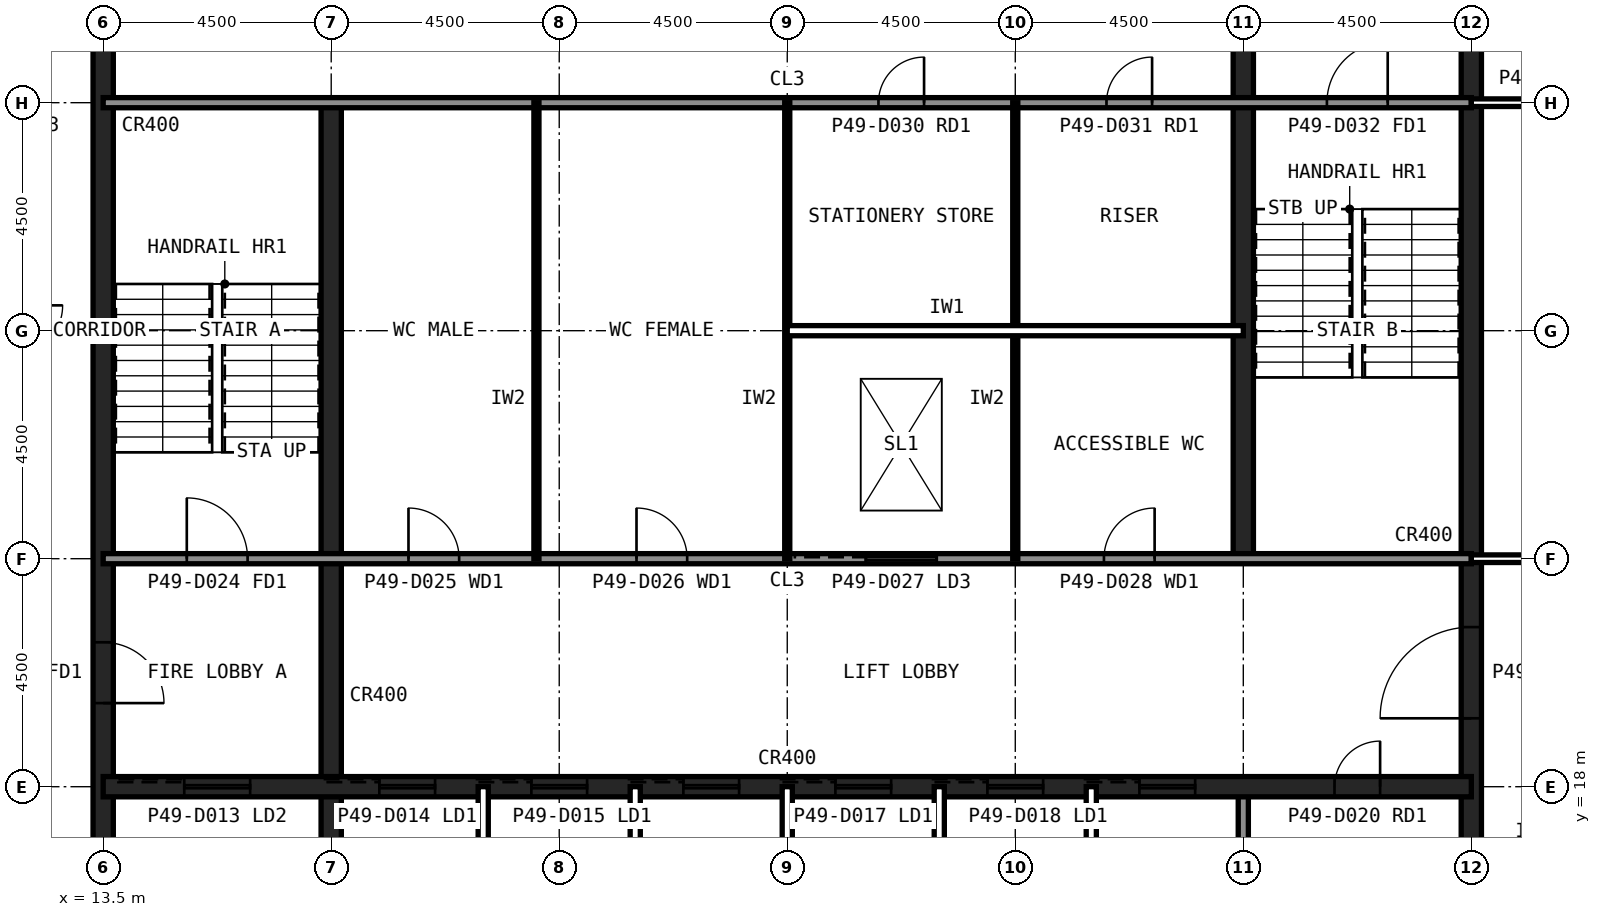
"""IFC4 building model, lengths in metres.
Left out: names, types, materials, properties, quantities, classifications, styles, units other than length and angle.
Written with IfcOpenShell. Run it as: python <this file> out.ifc"""

import sys

from ifc_helpers import new_model, si_unit, direction, frame, frame_2d, origin, place, context, subcontext, project, spatial, rectangle, extrude, element, fill, save


model = new_model("IFC4")
c1 = context("Model", 3, precision=1e-05, world=origin(), true_north=direction((0.0, 1.0)))
c2 = subcontext(c1, "Body", "Model", "MODEL_VIEW")
j1 = project(units=[si_unit("LENGTHUNIT", "METRE"), si_unit("PLANEANGLEUNIT", "RADIAN")], contexts=[c1])
p1 = place(None, origin())
s1 = spatial("IfcSite", under=j1, at=p1, CompositionType="ELEMENT")
p2 = place(p1, origin())
s2 = spatial("IfcBuilding", under=s1, at=p2, CompositionType="ELEMENT")
p3 = place(p2, frame((0.0, 0.0, 210.6)))
s3 = spatial("IfcBuildingStorey", under=s2, at=p3, CompositionType="ELEMENT", Elevation=210.6)
p4 = place(p3, frame((40.5, 13.5, 0.0), z_axis=(0.0, 0.0, 1.0), x_axis=(0.0, 1.0, 0.0)))
e1 = element("IfcWall", 1, at=p4, inside=s3, PredefinedType="SHEAR", context=c2, shape_type="SweptSolid", body=[
    extrude(rectangle(XDim=27.0, YDim=0.4, at=frame_2d((13.5, 0.0))), origin(), (0.0, 0.0, 1.0), 4.0),
])
p5 = place(p4, frame((5.85, 0.0, 0.0)))
e2 = element("IfcOpeningElement", 2, at=p5, cuts=e1, PredefinedType="OPENING", context=c2, shape_type="SweptSolid", body=[
    extrude(rectangle(XDim=1.8, YDim=2.1, at=frame_2d((0.9, 1.05))), frame((0.0, 0.21, 0.0), z_axis=(0.0, -1.0, 0.0), x_axis=(1.0, 0.0, 0.0)), (0.0, 0.0, 1.0), 0.42),
])
p6 = place(p4, frame((19.65, 0.0, 0.0)))
e3 = element("IfcOpeningElement", 3, at=p6, cuts=e1, PredefinedType="OPENING", context=c2, shape_type="SweptSolid", body=[
    extrude(rectangle(XDim=1.2, YDim=2.1, at=frame_2d((0.6, 1.05))), frame((0.0, 0.21, 0.0), z_axis=(0.0, -1.0, 0.0), x_axis=(1.0, 0.0, 0.0)), (0.0, 0.0, 1.0), 0.42),
])
p7 = place(p3, frame((13.5, 40.5, 0.0), z_axis=(0.0, 0.0, 1.0), x_axis=(0.0, -1.0, 0.0)))
e4 = element("IfcWall", 4, at=p7, inside=s3, PredefinedType="SHEAR", context=c2, shape_type="SweptSolid", body=[
    extrude(rectangle(XDim=27.0, YDim=0.4, at=frame_2d((13.5, 0.0))), origin(), (0.0, 0.0, 1.0), 4.0),
])
p8 = place(p7, frame((19.65, 0.0, 0.0)))
e5 = element("IfcOpeningElement", 5, at=p8, cuts=e4, PredefinedType="OPENING", context=c2, shape_type="SweptSolid", body=[
    extrude(rectangle(XDim=1.2, YDim=2.1, at=frame_2d((0.6, 1.05))), frame((0.0, 0.21, 0.0), z_axis=(0.0, -1.0, 0.0), x_axis=(1.0, 0.0, 0.0)), (0.0, 0.0, 1.0), 0.42),
])
p9 = place(p7, frame((5.85, 0.0, 0.0)))
e6 = element("IfcOpeningElement", 6, at=p9, cuts=e4, PredefinedType="OPENING", context=c2, shape_type="SweptSolid", body=[
    extrude(rectangle(XDim=1.8, YDim=2.1, at=frame_2d((0.9, 1.05))), frame((0.0, 0.21, 0.0), z_axis=(0.0, -1.0, 0.0), x_axis=(1.0, 0.0, 0.0)), (0.0, 0.0, 1.0), 0.42),
])
p10 = place(p3, frame((18.0, 13.5, 0.0), z_axis=(0.0, 0.0, 1.0), x_axis=(0.0, 1.0, 0.0)))
e7 = element("IfcWall", 7, at=p10, inside=s3, PredefinedType="SHEAR", context=c2, shape_type="SweptSolid", body=[
    extrude(rectangle(XDim=18.0, YDim=0.4, at=frame_2d((9.0, 0.0))), origin(), (0.0, 0.0, 1.0), 4.0),
])
p11 = place(p3, frame((36.0, 13.5, 0.0), z_axis=(0.0, 0.0, 1.0), x_axis=(0.0, 1.0, 0.0)))
e8 = element("IfcWall", 8, at=p11, inside=s3, PredefinedType="SOLIDWALL", context=c2, shape_type="SweptSolid", body=[
    extrude(rectangle(XDim=4.5, YDim=0.2, at=frame_2d((2.25, 0.0))), origin(), (0.0, 0.0, 1.0), 3.84),
])
p12 = place(p3, frame((36.0, 22.5, 0.0), z_axis=(0.0, 0.0, 1.0), x_axis=(0.0, 1.0, 0.0)))
e9 = element("IfcWall", 9, at=p12, inside=s3, PredefinedType="SHEAR", context=c2, shape_type="SweptSolid", body=[
    extrude(rectangle(XDim=18.0, YDim=0.4, at=frame_2d((9.0, 0.0))), origin(), (0.0, 0.0, 1.0), 4.0),
])
p13 = place(p3, frame((13.5, 18.0, 0.0), z_axis=(0.0, 0.0, 1.0), x_axis=(1.0, 0.0, 0.0)))
e10 = element("IfcWall", 10, at=p13, inside=s3, PredefinedType="SHEAR", context=c2, shape_type="SweptSolid", body=[
    extrude(rectangle(XDim=27.0, YDim=0.4, at=frame_2d((13.5, 0.0))), origin(), (0.0, 0.0, 1.0), 4.0),
])
p14 = place(p13, frame((24.3, 0.0, 0.0)))
e11 = element("IfcOpeningElement", 11, at=p14, cuts=e10, PredefinedType="OPENING", context=c2, shape_type="SweptSolid", body=[
    extrude(rectangle(XDim=0.9, YDim=2.1, at=frame_2d((0.45, 1.05))), frame((0.0, 0.21, 0.0), z_axis=(0.0, -1.0, 0.0), x_axis=(1.0, 0.0, 0.0)), (0.0, 0.0, 1.0), 0.42),
])
p15 = place(p13, frame((5.45, 0.0, 0.0)))
e12 = element("IfcOpeningElement", 12, at=p15, cuts=e10, PredefinedType="OPENING", context=c2, shape_type="SweptSolid", body=[
    extrude(rectangle(XDim=1.1, YDim=2.1, at=frame_2d((0.55, 1.05))), frame((0.0, 0.21, 0.0), z_axis=(0.0, -1.0, 0.0), x_axis=(1.0, 0.0, 0.0)), (0.0, 0.0, 1.0), 0.42),
])
p16 = place(p13, frame((8.45, 0.0, 0.0)))
e13 = element("IfcOpeningElement", 13, at=p16, cuts=e10, PredefinedType="OPENING", context=c2, shape_type="SweptSolid", body=[
    extrude(rectangle(XDim=1.1, YDim=2.1, at=frame_2d((0.55, 1.05))), frame((0.0, 0.21, 0.0), z_axis=(0.0, -1.0, 0.0), x_axis=(1.0, 0.0, 0.0)), (0.0, 0.0, 1.0), 0.42),
])
p17 = place(p13, frame((11.45, 0.0, 0.0)))
e14 = element("IfcOpeningElement", 14, at=p17, cuts=e10, PredefinedType="OPENING", context=c2, shape_type="SweptSolid", body=[
    extrude(rectangle(XDim=1.1, YDim=2.1, at=frame_2d((0.55, 1.05))), frame((0.0, 0.21, 0.0), z_axis=(0.0, -1.0, 0.0), x_axis=(1.0, 0.0, 0.0)), (0.0, 0.0, 1.0), 0.42),
])
p18 = place(p13, frame((14.45, 0.0, 0.0)))
e15 = element("IfcOpeningElement", 15, at=p18, cuts=e10, PredefinedType="OPENING", context=c2, shape_type="SweptSolid", body=[
    extrude(rectangle(XDim=1.1, YDim=2.1, at=frame_2d((0.55, 1.05))), frame((0.0, 0.21, 0.0), z_axis=(0.0, -1.0, 0.0), x_axis=(1.0, 0.0, 0.0)), (0.0, 0.0, 1.0), 0.42),
])
p19 = place(p13, frame((17.45, 0.0, 0.0)))
e16 = element("IfcOpeningElement", 16, at=p19, cuts=e10, PredefinedType="OPENING", context=c2, shape_type="SweptSolid", body=[
    extrude(rectangle(XDim=1.1, YDim=2.1, at=frame_2d((0.55, 1.05))), frame((0.0, 0.21, 0.0), z_axis=(0.0, -1.0, 0.0), x_axis=(1.0, 0.0, 0.0)), (0.0, 0.0, 1.0), 0.42),
])
p20 = place(p13, frame((20.45, 0.0, 0.0)))
e17 = element("IfcOpeningElement", 17, at=p20, cuts=e10, PredefinedType="OPENING", context=c2, shape_type="SweptSolid", body=[
    extrude(rectangle(XDim=1.1, YDim=2.1, at=frame_2d((0.55, 1.05))), frame((0.0, 0.21, 0.0), z_axis=(0.0, -1.0, 0.0), x_axis=(1.0, 0.0, 0.0)), (0.0, 0.0, 1.0), 0.42),
])
p21 = place(p13, frame((1.6, 0.0, 0.0)))
e18 = element("IfcOpeningElement", 18, at=p21, cuts=e10, PredefinedType="OPENING", context=c2, shape_type="SweptSolid", body=[
    extrude(rectangle(XDim=1.3, YDim=2.2, at=frame_2d((0.65, 1.1))), frame((0.0, 0.21, 0.0), z_axis=(0.0, -1.0, 0.0), x_axis=(1.0, 0.0, 0.0)), (0.0, 0.0, 1.0), 0.42),
])
p22 = place(p3, frame((13.5, 22.5, 0.0), z_axis=(0.0, 0.0, 1.0), x_axis=(1.0, 0.0, 0.0)))
e19 = element("IfcWall", 19, at=p22, inside=s3, PredefinedType="SOLIDWALL", context=c2, shape_type="SweptSolid", body=[
    extrude(rectangle(XDim=27.0, YDim=0.2, at=frame_2d((13.5, 0.0))), origin(), (0.0, 0.0, 1.0), 3.84),
])
p23 = place(p22, frame((1.65, 0.0, 0.0)))
e20 = element("IfcOpeningElement", 20, at=p23, cuts=e19, PredefinedType="OPENING", context=c2, shape_type="SweptSolid", body=[
    extrude(rectangle(XDim=1.2, YDim=2.1, at=frame_2d((0.6, 1.05))), frame((0.0, 0.11, 0.0), z_axis=(0.0, -1.0, 0.0), x_axis=(1.0, 0.0, 0.0)), (0.0, 0.0, 1.0), 0.22),
])
p24 = place(p22, frame((6.025, 0.0, 0.0)))
e21 = element("IfcOpeningElement", 21, at=p24, cuts=e19, PredefinedType="OPENING", context=c2, shape_type="SweptSolid", body=[
    extrude(rectangle(XDim=1.0, YDim=2.1, at=frame_2d((0.5, 1.05))), frame((0.0, 0.11, 0.0), z_axis=(0.0, -1.0, 0.0), x_axis=(1.0, 0.0, 0.0)), (0.0, 0.0, 1.0), 0.22),
])
p25 = place(p22, frame((10.525, 0.0, 0.0)))
e22 = element("IfcOpeningElement", 22, at=p25, cuts=e19, PredefinedType="OPENING", context=c2, shape_type="SweptSolid", body=[
    extrude(rectangle(XDim=1.0, YDim=2.1, at=frame_2d((0.5, 1.05))), frame((0.0, 0.11, 0.0), z_axis=(0.0, -1.0, 0.0), x_axis=(1.0, 0.0, 0.0)), (0.0, 0.0, 1.0), 0.22),
])
p26 = place(p22, frame((19.75, 0.0, 0.0)))
e23 = element("IfcOpeningElement", 23, at=p26, cuts=e19, PredefinedType="OPENING", context=c2, shape_type="SweptSolid", body=[
    extrude(rectangle(XDim=1.0, YDim=2.1, at=frame_2d((0.5, 1.05))), frame((0.0, 0.11, 0.0), z_axis=(0.0, -1.0, 0.0), x_axis=(1.0, 0.0, 0.0)), (0.0, 0.0, 1.0), 0.22),
])
p27 = place(p22, frame((15.05, 0.0, 0.0)))
e24 = element("IfcOpeningElement", 24, at=p27, cuts=e19, PredefinedType="OPENING", context=c2, shape_type="SweptSolid", body=[
    extrude(rectangle(XDim=1.4, YDim=2.4, at=frame_2d((0.7, 1.2))), frame((0.0, 0.11, 0.0), z_axis=(0.0, -1.0, 0.0), x_axis=(1.0, 0.0, 0.0)), (0.0, 0.0, 1.0), 0.22),
])
p28 = place(p3, frame((13.5, 31.5, 0.0), z_axis=(0.0, 0.0, 1.0), x_axis=(1.0, 0.0, 0.0)))
e25 = element("IfcWall", 25, at=p28, inside=s3, PredefinedType="SOLIDWALL", context=c2, shape_type="SweptSolid", body=[
    extrude(rectangle(XDim=27.0, YDim=0.2, at=frame_2d((13.5, 0.0))), origin(), (0.0, 0.0, 1.0), 3.84),
])
p29 = place(p28, frame((24.15, 0.0, 0.0)))
e26 = element("IfcOpeningElement", 26, at=p29, cuts=e25, PredefinedType="OPENING", context=c2, shape_type="SweptSolid", body=[
    extrude(rectangle(XDim=1.2, YDim=2.1, at=frame_2d((0.6, 1.05))), frame((0.0, 0.11, 0.0), z_axis=(0.0, -1.0, 0.0), x_axis=(1.0, 0.0, 0.0)), (0.0, 0.0, 1.0), 0.22),
])
p30 = place(p28, frame((15.3, 0.0, 0.0)))
e27 = element("IfcOpeningElement", 27, at=p30, cuts=e25, PredefinedType="OPENING", context=c2, shape_type="SweptSolid", body=[
    extrude(rectangle(XDim=0.9, YDim=2.1, at=frame_2d((0.45, 1.05))), frame((0.0, 0.11, 0.0), z_axis=(0.0, -1.0, 0.0), x_axis=(1.0, 0.0, 0.0)), (0.0, 0.0, 1.0), 0.22),
])
p31 = place(p28, frame((19.8, 0.0, 0.0)))
e28 = element("IfcOpeningElement", 28, at=p31, cuts=e25, PredefinedType="OPENING", context=c2, shape_type="SweptSolid", body=[
    extrude(rectangle(XDim=0.9, YDim=2.1, at=frame_2d((0.45, 1.05))), frame((0.0, 0.11, 0.0), z_axis=(0.0, -1.0, 0.0), x_axis=(1.0, 0.0, 0.0)), (0.0, 0.0, 1.0), 0.22),
])
for number, where, z_axis, x_axis in (
    (29, (21.0, 13.5, 0.0), (0.0, 0.0, 1.0), (0.0, 1.0, 0.0)),
    (30, (24.0, 13.5, 0.0), (0.0, 0.0, 1.0), (0.0, 1.0, 0.0)),
    (31, (27.0, 13.5, 0.0), (0.0, 0.0, 1.0), (0.0, 1.0, 0.0)),
    (32, (30.0, 13.5, 0.0), (0.0, 0.0, 1.0), (0.0, 1.0, 0.0)),
    (33, (33.0, 13.5, 0.0), (0.0, 0.0, 1.0), (0.0, 1.0, 0.0)),
):
    element("IfcWall", number, at=place(p3, frame(where, z_axis=z_axis, x_axis=x_axis)), inside=s3, PredefinedType="PARTITIONING", context=c2, shape_type="SweptSolid", body=[
        extrude(rectangle(XDim=4.5, YDim=0.2, at=frame_2d((2.25, 0.0))), origin(), (0.0, 0.0, 1.0), 3.84),
    ])
for number, where, z_axis, x_axis in (
    (34, (22.05, 22.5, 0.0), (0.0, 0.0, 1.0), (0.0, 1.0, 0.0)),
    (35, (27.0, 22.5, 0.0), (0.0, 0.0, 1.0), (0.0, 1.0, 0.0)),
    (36, (31.5, 22.5, 0.0), (0.0, 0.0, 1.0), (0.0, 1.0, 0.0)),
):
    element("IfcWall", number, at=place(p3, frame(where, z_axis=z_axis, x_axis=x_axis)), inside=s3, PredefinedType="PLUMBINGWALL", context=c2, shape_type="SweptSolid", body=[
        extrude(rectangle(XDim=9.0, YDim=0.1, at=frame_2d((4.5, 0.0))), origin(), (0.0, 0.0, 1.0), 3.84),
    ])
p32 = place(p3, frame((27.0, 27.0, 0.0), z_axis=(0.0, 0.0, 1.0), x_axis=(1.0, 0.0, 0.0)))
e37 = element("IfcWall", 37, at=p32, inside=s3, PredefinedType="PARTITIONING", context=c2, shape_type="SweptSolid", body=[
    extrude(rectangle(XDim=9.0, YDim=0.2, at=frame_2d((4.5, 0.0))), origin(), (0.0, 0.0, 1.0), 3.84),
])
p33 = place(p3, frame((40.5, 22.5, 0.0), z_axis=(0.0, 0.0, 1.0), x_axis=(1.0, 0.0, 0.0)))
e38 = element("IfcWall", 38, at=p33, inside=s3, PredefinedType="PARTITIONING", context=c2, shape_type="SweptSolid", body=[
    extrude(rectangle(XDim=3.6, YDim=0.15, at=frame_2d((1.8, 0.0))), origin(), (0.0, 0.0, 1.0), 2.989),
])
p34 = place(p3, frame((44.1, 31.5, 0.0), z_axis=(0.0, 0.0, 1.0), x_axis=(-1.0, 0.0, 0.0)))
e39 = element("IfcWall", 39, at=p34, inside=s3, PredefinedType="PARTITIONING", context=c2, shape_type="SweptSolid", body=[
    extrude(rectangle(XDim=3.6, YDim=0.15, at=frame_2d((1.8, 0.0))), origin(), (0.0, 0.0, 1.0), 2.989),
])
p35 = place(p34, frame((1.3, 0.0, 0.0)))
e40 = element("IfcOpeningElement", 40, at=p35, cuts=e39, PredefinedType="OPENING", context=c2, shape_type="SweptSolid", body=[
    extrude(rectangle(XDim=1.0, YDim=2.1, at=frame_2d((0.5, 1.05))), frame((0.0, 0.085, 0.0), z_axis=(0.0, -1.0, 0.0), x_axis=(1.0, 0.0, 0.0)), (0.0, 0.0, 1.0), 0.17),
])
p36 = place(p8, origin())
e41 = element("IfcDoor", 41, at=p36, inside=s3, OperationType="SINGLE_SWING_RIGHT", PredefinedType="DOOR", context=c2, shape_type="SweptSolid", body=[
    extrude(rectangle(XDim=1.2, YDim=2.1, at=frame_2d((0.6, 1.05))), frame((0.0, 0.025, 0.0), z_axis=(0.0, -1.0, 0.0), x_axis=(1.0, 0.0, 0.0)), (0.0, 0.0, 1.0), 0.05),
])
fill(e5, e41)
p37 = place(p5, origin())
e42 = element("IfcDoor", 42, at=p37, inside=s3, OperationType="SINGLE_SWING_LEFT", PredefinedType="DOOR", context=c2, shape_type="SweptSolid", body=[
    extrude(rectangle(XDim=1.8, YDim=2.1, at=frame_2d((0.9, 1.05))), frame((0.0, 0.025, 0.0), z_axis=(0.0, -1.0, 0.0), x_axis=(1.0, 0.0, 0.0)), (0.0, 0.0, 1.0), 0.05),
])
fill(e2, e42)
p38 = place(p23, origin())
e43 = element("IfcDoor", 43, at=p38, inside=s3, OperationType="SINGLE_SWING_LEFT", PredefinedType="DOOR", context=c2, shape_type="SweptSolid", body=[
    extrude(rectangle(XDim=1.2, YDim=2.1, at=frame_2d((0.6, 1.05))), frame((0.0, 0.025, 0.0), z_axis=(0.0, -1.0, 0.0), x_axis=(1.0, 0.0, 0.0)), (0.0, 0.0, 1.0), 0.05),
])
fill(e20, e43)
p39 = place(p29, origin())
e44 = element("IfcDoor", 44, at=p39, inside=s3, OperationType="SINGLE_SWING_RIGHT", PredefinedType="DOOR", context=c2, shape_type="SweptSolid", body=[
    extrude(rectangle(XDim=1.2, YDim=2.1, at=frame_2d((0.6, 1.05))), frame((0.0, 0.025, 0.0), z_axis=(0.0, -1.0, 0.0), x_axis=(1.0, 0.0, 0.0)), (0.0, 0.0, 1.0), 0.05),
])
fill(e26, e44)
p40 = place(p24, origin())
e45 = element("IfcDoor", 45, at=p40, inside=s3, OperationType="SINGLE_SWING_LEFT", PredefinedType="DOOR", context=c2, shape_type="SweptSolid", body=[
    extrude(rectangle(XDim=1.0, YDim=2.1, at=frame_2d((0.5, 1.05))), frame((0.0, 0.025, 0.0), z_axis=(0.0, -1.0, 0.0), x_axis=(1.0, 0.0, 0.0)), (0.0, 0.0, 1.0), 0.05),
])
fill(e21, e45)
p41 = place(p25, origin())
e46 = element("IfcDoor", 46, at=p41, inside=s3, OperationType="SINGLE_SWING_LEFT", PredefinedType="DOOR", context=c2, shape_type="SweptSolid", body=[
    extrude(rectangle(XDim=1.0, YDim=2.1, at=frame_2d((0.5, 1.05))), frame((0.0, 0.025, 0.0), z_axis=(0.0, -1.0, 0.0), x_axis=(1.0, 0.0, 0.0)), (0.0, 0.0, 1.0), 0.05),
])
fill(e22, e46)
p42 = place(p26, origin())
e47 = element("IfcDoor", 47, at=p42, inside=s3, OperationType="SINGLE_SWING_RIGHT", PredefinedType="DOOR", context=c2, shape_type="SweptSolid", body=[
    extrude(rectangle(XDim=1.0, YDim=2.1, at=frame_2d((0.5, 1.05))), frame((0.0, 0.025, 0.0), z_axis=(0.0, -1.0, 0.0), x_axis=(1.0, 0.0, 0.0)), (0.0, 0.0, 1.0), 0.05),
])
fill(e23, e47)
p43 = place(p30, origin())
e48 = element("IfcDoor", 48, at=p43, inside=s3, OperationType="SINGLE_SWING_RIGHT", PredefinedType="DOOR", context=c2, shape_type="SweptSolid", body=[
    extrude(rectangle(XDim=0.9, YDim=2.1, at=frame_2d((0.45, 1.05))), frame((0.0, 0.025, 0.0), z_axis=(0.0, -1.0, 0.0), x_axis=(1.0, 0.0, 0.0)), (0.0, 0.0, 1.0), 0.05),
])
fill(e27, e48)
p44 = place(p31, origin())
e49 = element("IfcDoor", 49, at=p44, inside=s3, OperationType="SINGLE_SWING_RIGHT", PredefinedType="DOOR", context=c2, shape_type="SweptSolid", body=[
    extrude(rectangle(XDim=0.9, YDim=2.1, at=frame_2d((0.45, 1.05))), frame((0.0, 0.025, 0.0), z_axis=(0.0, -1.0, 0.0), x_axis=(1.0, 0.0, 0.0)), (0.0, 0.0, 1.0), 0.05),
])
fill(e28, e49)
p45 = place(p14, origin())
e50 = element("IfcDoor", 50, at=p45, inside=s3, OperationType="SINGLE_SWING_RIGHT", PredefinedType="DOOR", context=c2, shape_type="SweptSolid", body=[
    extrude(rectangle(XDim=0.9, YDim=2.1, at=frame_2d((0.45, 1.05))), frame((0.0, 0.025, 0.0), z_axis=(0.0, -1.0, 0.0), x_axis=(1.0, 0.0, 0.0)), (0.0, 0.0, 1.0), 0.05),
])
fill(e11, e50)
p46 = place(p15, origin())
e51 = element("IfcDoor", 51, at=p46, inside=s3, OperationType="SLIDING_TO_LEFT", PredefinedType="DOOR", context=c2, shape_type="SweptSolid", body=[
    extrude(rectangle(XDim=1.1, YDim=2.1, at=frame_2d((0.55, 1.05))), frame((0.0, 0.025, 0.0), z_axis=(0.0, -1.0, 0.0), x_axis=(1.0, 0.0, 0.0)), (0.0, 0.0, 1.0), 0.05),
])
fill(e12, e51)
p47 = place(p16, origin())
e52 = element("IfcDoor", 52, at=p47, inside=s3, OperationType="SLIDING_TO_LEFT", PredefinedType="DOOR", context=c2, shape_type="SweptSolid", body=[
    extrude(rectangle(XDim=1.1, YDim=2.1, at=frame_2d((0.55, 1.05))), frame((0.0, 0.025, 0.0), z_axis=(0.0, -1.0, 0.0), x_axis=(1.0, 0.0, 0.0)), (0.0, 0.0, 1.0), 0.05),
])
fill(e13, e52)
p48 = place(p17, origin())
e53 = element("IfcDoor", 53, at=p48, inside=s3, OperationType="SLIDING_TO_LEFT", PredefinedType="DOOR", context=c2, shape_type="SweptSolid", body=[
    extrude(rectangle(XDim=1.1, YDim=2.1, at=frame_2d((0.55, 1.05))), frame((0.0, 0.025, 0.0), z_axis=(0.0, -1.0, 0.0), x_axis=(1.0, 0.0, 0.0)), (0.0, 0.0, 1.0), 0.05),
])
fill(e14, e53)
p49 = place(p18, origin())
e54 = element("IfcDoor", 54, at=p49, inside=s3, OperationType="SLIDING_TO_LEFT", PredefinedType="DOOR", context=c2, shape_type="SweptSolid", body=[
    extrude(rectangle(XDim=1.1, YDim=2.1, at=frame_2d((0.55, 1.05))), frame((0.0, 0.025, 0.0), z_axis=(0.0, -1.0, 0.0), x_axis=(1.0, 0.0, 0.0)), (0.0, 0.0, 1.0), 0.05),
])
fill(e15, e54)
p50 = place(p19, origin())
e55 = element("IfcDoor", 55, at=p50, inside=s3, OperationType="SLIDING_TO_LEFT", PredefinedType="DOOR", context=c2, shape_type="SweptSolid", body=[
    extrude(rectangle(XDim=1.1, YDim=2.1, at=frame_2d((0.55, 1.05))), frame((0.0, 0.025, 0.0), z_axis=(0.0, -1.0, 0.0), x_axis=(1.0, 0.0, 0.0)), (0.0, 0.0, 1.0), 0.05),
])
fill(e16, e55)
p51 = place(p20, origin())
e56 = element("IfcDoor", 56, at=p51, inside=s3, OperationType="SLIDING_TO_LEFT", PredefinedType="DOOR", context=c2, shape_type="SweptSolid", body=[
    extrude(rectangle(XDim=1.1, YDim=2.1, at=frame_2d((0.55, 1.05))), frame((0.0, 0.025, 0.0), z_axis=(0.0, -1.0, 0.0), x_axis=(1.0, 0.0, 0.0)), (0.0, 0.0, 1.0), 0.05),
])
fill(e17, e56)
p52 = place(p21, origin())
e57 = element("IfcDoor", 57, at=p52, inside=s3, OperationType="SLIDING_TO_LEFT", PredefinedType="DOOR", context=c2, shape_type="SweptSolid", body=[
    extrude(rectangle(XDim=1.3, YDim=2.2, at=frame_2d((0.65, 1.1))), frame((0.0, 0.025, 0.0), z_axis=(0.0, -1.0, 0.0), x_axis=(1.0, 0.0, 0.0)), (0.0, 0.0, 1.0), 0.05),
])
fill(e18, e57)
p53 = place(p27, origin())
e58 = element("IfcDoor", 58, at=p53, inside=s3, OperationType="SLIDING_TO_LEFT", PredefinedType="DOOR", context=c2, shape_type="SweptSolid", body=[
    extrude(rectangle(XDim=1.4, YDim=2.4, at=frame_2d((0.7, 1.2))), frame((0.0, 0.025, 0.0), z_axis=(0.0, -1.0, 0.0), x_axis=(1.0, 0.0, 0.0)), (0.0, 0.0, 1.0), 0.05),
])
fill(e24, e58)
save(model, sys.argv[1])
